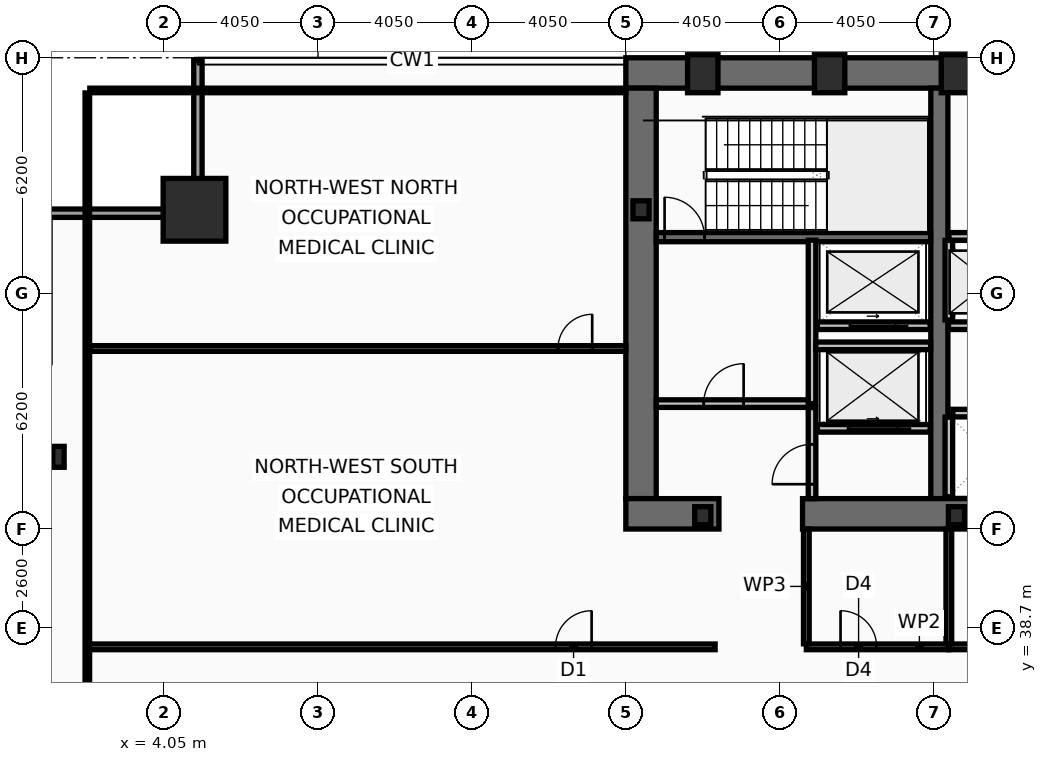
"""IFC4 building model, lengths in metres.
Left out: names, types, materials, properties, quantities, classifications, styles, units other than length and angle.
Written with IfcOpenShell. Run it as: python <this file> out.ifc"""

import sys

from ifc_helpers import new_model, si_unit, direction, frame, frame_2d, origin, origin_2d, place, context, subcontext, project, spatial, rectangle, hollow_rectangle, i_section, extrude, element, fill, save


model = new_model("IFC4")
c1 = context("Model", 3, precision=1e-05, world=origin(), true_north=direction((0.0, 1.0)))
c2 = subcontext(c1, "Body", "Model", "MODEL_VIEW")
j1 = project(units=[si_unit("LENGTHUNIT", "METRE"), si_unit("PLANEANGLEUNIT", "RADIAN")], contexts=[c1])
p1 = place(None, origin())
s1 = spatial("IfcSite", under=j1, at=p1, CompositionType="ELEMENT")
p2 = place(p1, origin())
s2 = spatial("IfcBuilding", under=s1, at=p2, CompositionType="ELEMENT")
p3 = place(p2, frame((0.0, 0.0, 73.8)))
s3 = spatial("IfcBuildingStorey", under=s2, at=p3, CompositionType="ELEMENT", Elevation=73.8)
p4 = place(p3, frame((16.2, 53.3, 0.0), z_axis=(0.0, 0.0, 1.0), x_axis=(1.0, 0.0, 0.0)))
e1 = element("IfcWall", 1, at=p4, inside=s3, PredefinedType="SHEAR", context=c2, shape_type="SweptSolid", body=[
    extrude(rectangle(XDim=40.5, YDim=0.8, at=frame_2d((20.25, 0.0))), origin(), (0.0, 0.0, 1.0), 3.82),
])
p5 = place(p3, frame((16.6, 42.1, 0.0), z_axis=(0.0, 0.0, 1.0), x_axis=(0.0, 1.0, 0.0)))
e2 = element("IfcWall", 2, at=p5, inside=s3, PredefinedType="SHEAR", context=c2, shape_type="SweptSolid", body=[
    extrude(rectangle(XDim=10.8, YDim=0.8, at=frame_2d((5.4, 0.0))), origin(), (0.0, 0.0, 1.0), 3.82),
])
p6 = place(p3, frame((24.45, 42.1, 0.0), z_axis=(0.0, 0.0, 1.0), x_axis=(0.0, 1.0, 0.0)))
e3 = element("IfcWall", 3, at=p6, inside=s3, PredefinedType="SHEAR", context=c2, shape_type="SweptSolid", body=[
    extrude(rectangle(XDim=10.8, YDim=0.45, at=frame_2d((5.4, 0.0))), origin(), (0.0, 0.0, 1.0), 3.82),
])
p7 = place(p3, frame((18.65, 41.7, 0.0), z_axis=(0.0, 0.0, 1.0), x_axis=(-1.0, 0.0, 0.0)))
e4 = element("IfcWall", 4, at=p7, inside=s3, PredefinedType="SHEAR", context=c2, shape_type="SweptSolid", body=[
    extrude(rectangle(XDim=2.45, YDim=0.8, at=frame_2d((1.225, 0.0))), origin(), (0.0, 0.0, 1.0), 3.82),
])
p8 = place(p3, frame((32.3, 41.7, 0.0), z_axis=(0.0, 0.0, 1.0), x_axis=(-1.0, 0.0, 0.0)))
e5 = element("IfcWall", 5, at=p8, inside=s3, PredefinedType="SHEAR", context=c2, shape_type="SweptSolid", body=[
    extrude(rectangle(XDim=11.45, YDim=0.8, at=frame_2d((5.725, 0.0))), origin(), (0.0, 0.0, 1.0), 3.82),
])
p9 = place(p3, frame((17.0, 48.98, 0.0), z_axis=(0.0, 0.0, 1.0), x_axis=(1.0, 0.0, 0.0)))
e6 = element("IfcWall", 6, at=p9, inside=s3, PredefinedType="SHEAR", context=c2, shape_type="SweptSolid", body=[
    extrude(rectangle(XDim=7.22, YDim=0.24, at=frame_2d((3.61, 0.0))), origin(), (0.0, 0.0, 1.0), 3.82),
])
p10 = place(p9, frame((0.22, 0.0, 0.0)))
e7 = element("IfcOpeningElement", 7, at=p10, cuts=e6, PredefinedType="OPENING", context=c2, shape_type="SweptSolid", body=[
    extrude(rectangle(XDim=1.05, YDim=2.15, at=frame_2d((0.525, 1.075))), frame((0.0, 0.13, 0.0), z_axis=(0.0, -1.0, 0.0), x_axis=(1.0, 0.0, 0.0)), (0.0, 0.0, 1.0), 0.26),
])
p11 = place(p3, frame((4.85, 49.7, 0.0), z_axis=(0.0, 0.0, 1.0), x_axis=(1.0, 0.0, 0.0)))
e8 = element("IfcColumn", 8, at=p11, inside=s3, PredefinedType="COLUMN", context=c2, shape_type="SweptSolid", body=[
    extrude(hollow_rectangle(XDim=1.65, YDim=1.65, WallThickness=0.075, at=origin_2d()), origin(), (0.0, 0.0, 1.0), 4.0),
])
for number, where, z_axis, x_axis in (
    (9, (18.225, 53.28, 0.0), (0.0, 0.0, 1.0), (1.0, 0.0, 0.0)),
    (10, (21.562, 53.28, 0.0), (0.0, 0.0, 1.0), (1.0, 0.0, 0.0)),
    (11, (24.9, 53.28, 0.0), (0.0, 0.0, 1.0), (1.0, 0.0, 0.0)),
):
    element("IfcColumn", number, at=place(p3, frame(where, z_axis=z_axis, x_axis=x_axis)), inside=s3, PredefinedType="COLUMN", context=c2, shape_type="SweptSolid", body=[
        extrude(hollow_rectangle(XDim=0.8, YDim=1.0, WallThickness=0.055, at=origin_2d()), origin(), (0.0, 0.0, 1.0), 4.0),
    ])
p12 = place(p3, frame((1.27, 43.2, 0.0), z_axis=(0.0, 0.0, 1.0), x_axis=(1.0, 0.0, 0.0)))
e12 = element("IfcColumn", 12, at=p12, inside=s3, PredefinedType="COLUMN", context=c2, shape_type="SweptSolid", body=[
    extrude(i_section(OverallWidth=0.3, OverallDepth=0.55, WebThickness=0.015, FlangeThickness=0.029, at=origin_2d()), origin(), (0.0, 0.0, 1.0), 4.0),
])
for number, where, z_axis, x_axis in (
    (13, (16.6, 49.7, 0.0), (0.0, 0.0, 1.0), (1.0, 0.0, 0.0)),
    (14, (18.225, 41.65, 0.0), (0.0, 0.0, 1.0), (1.0, 0.0, 0.0)),
    (15, (24.9, 41.65, 0.0), (0.0, 0.0, 1.0), (1.0, 0.0, 0.0)),
):
    element("IfcColumn", number, at=place(p3, frame(where, z_axis=z_axis, x_axis=x_axis)), inside=s3, PredefinedType="COLUMN", context=c2, shape_type="SweptSolid", body=[
        extrude(i_section(OverallWidth=0.424, OverallDepth=0.474, WebThickness=0.048, FlangeThickness=0.077, at=origin_2d()), origin(), (0.0, 0.0, 1.0), 4.0),
    ])
p13 = place(p3, frame((0.83, 49.61, 0.0), z_axis=(0.0, 0.0, 1.0), x_axis=(1.0, 0.0, 0.0)))
e16 = element("IfcWall", 16, at=p13, inside=s3, PredefinedType="SOLIDWALL", context=c2, shape_type="SweptSolid", body=[
    extrude(rectangle(XDim=4.22, YDim=0.22, at=frame_2d((2.11, 0.0))), origin(), (0.0, 0.0, 1.0), 3.16),
])
p14 = place(p3, frame((4.94, 49.72, 0.0), z_axis=(0.0, 0.0, 1.0), x_axis=(0.0, 1.0, 0.0)))
e17 = element("IfcWall", 17, at=p14, inside=s3, PredefinedType="SOLIDWALL", context=c2, shape_type="SweptSolid", body=[
    extrude(rectangle(XDim=3.91, YDim=0.22, at=frame_2d((1.955, 0.0))), origin(), (0.0, 0.0, 1.0), 3.16),
])
p15 = place(p3, frame((24.21, 43.95, 0.0), z_axis=(0.0, 0.0, 1.0), x_axis=(-1.0, 0.0, 0.0)))
e18 = element("IfcWall", 18, at=p15, inside=s3, PredefinedType="PARTITIONING", context=c2, shape_type="SweptSolid", body=[
    extrude(rectangle(XDim=2.97, YDim=0.2, at=frame_2d((1.485, 0.0))), origin(), (0.0, 0.0, 1.0), 3.82),
])
p16 = place(p15, frame((0.86, 0.0, 0.0)))
e19 = element("IfcOpeningElement", 19, at=p16, cuts=e18, PredefinedType="OPENING", context=c2, shape_type="SweptSolid", body=[
    extrude(rectangle(XDim=1.3, YDim=2.18, at=frame_2d((0.65, 1.09))), frame((0.0, 0.11, 0.0), z_axis=(0.0, -1.0, 0.0), x_axis=(1.0, 0.0, 0.0)), (0.0, 0.0, 1.0), 0.22),
])
p17 = place(p3, frame((24.21, 46.65, 0.0), z_axis=(0.0, 0.0, 1.0), x_axis=(-1.0, 0.0, 0.0)))
e20 = element("IfcWall", 20, at=p17, inside=s3, PredefinedType="PARTITIONING", context=c2, shape_type="SweptSolid", body=[
    extrude(rectangle(XDim=2.97, YDim=0.2, at=frame_2d((1.485, 0.0))), origin(), (0.0, 0.0, 1.0), 3.82),
])
p18 = place(p17, frame((0.91, 0.0, 0.0)))
e21 = element("IfcOpeningElement", 21, at=p18, cuts=e20, PredefinedType="OPENING", context=c2, shape_type="SweptSolid", body=[
    extrude(rectangle(XDim=1.2, YDim=2.18, at=frame_2d((0.6, 1.09))), frame((0.0, 0.11, 0.0), z_axis=(0.0, -1.0, 0.0), x_axis=(1.0, 0.0, 0.0)), (0.0, 0.0, 1.0), 0.22),
])
p19 = place(p3, frame((31.22, 46.65, 0.0), z_axis=(0.0, 0.0, 1.0), x_axis=(-1.0, 0.0, 0.0)))
e22 = element("IfcWall", 22, at=p19, inside=s3, PredefinedType="PARTITIONING", context=c2, shape_type="SweptSolid", body=[
    extrude(rectangle(XDim=6.53, YDim=0.2, at=frame_2d((3.265, 0.0))), origin(), (0.0, 0.0, 1.0), 3.82),
])
p20 = place(p19, frame((4.9, 0.0, 0.0)))
e23 = element("IfcOpeningElement", 23, at=p20, cuts=e22, PredefinedType="OPENING", context=c2, shape_type="SweptSolid", body=[
    extrude(rectangle(XDim=1.1, YDim=2.18, at=frame_2d((0.55, 1.09))), frame((0.0, 0.11, 0.0), z_axis=(0.0, -1.0, 0.0), x_axis=(1.0, 0.0, 0.0)), (0.0, 0.0, 1.0), 0.22),
])
p21 = place(p19, frame((2.74, 0.0, 0.0)))
e24 = element("IfcOpeningElement", 24, at=p21, cuts=e22, PredefinedType="OPENING", context=c2, shape_type="SweptSolid", body=[
    extrude(rectangle(XDim=1.1, YDim=2.18, at=frame_2d((0.55, 1.09))), frame((0.0, 0.11, 0.0), z_axis=(0.0, -1.0, 0.0), x_axis=(1.0, 0.0, 0.0)), (0.0, 0.0, 1.0), 0.22),
])
p22 = place(p19, frame((0.58, 0.0, 0.0)))
e25 = element("IfcOpeningElement", 25, at=p22, cuts=e22, PredefinedType="OPENING", context=c2, shape_type="SweptSolid", body=[
    extrude(rectangle(XDim=1.1, YDim=2.18, at=frame_2d((0.55, 1.09))), frame((0.0, 0.11, 0.0), z_axis=(0.0, -1.0, 0.0), x_axis=(1.0, 0.0, 0.0)), (0.0, 0.0, 1.0), 0.22),
])
p23 = place(p3, frame((21.1, 44.6, 0.0), z_axis=(0.0, 0.0, 1.0), x_axis=(0.0, 1.0, 0.0)))
e26 = element("IfcWall", 26, at=p23, inside=s3, PredefinedType="PARTITIONING", context=c2, shape_type="SweptSolid", body=[
    extrude(rectangle(XDim=4.3, YDim=0.2, at=frame_2d((2.15, 0.0))), origin(), (0.0, 0.0, 1.0), 3.82),
])
p24 = place(p3, frame((17.0, 44.6, 0.0), z_axis=(0.0, 0.0, 1.0), x_axis=(1.0, 0.0, 0.0)))
e27 = element("IfcWall", 27, at=p24, inside=s3, PredefinedType="PARTITIONING", context=c2, shape_type="SweptSolid", body=[
    extrude(rectangle(XDim=4.0, YDim=0.2, at=frame_2d((2.0, 0.0))), origin(), (0.0, 0.0, 1.0), 3.82),
])
p25 = place(p24, frame((1.25, 0.0, 0.0)))
e28 = element("IfcOpeningElement", 28, at=p25, cuts=e27, PredefinedType="OPENING", context=c2, shape_type="SweptSolid", body=[
    extrude(rectangle(XDim=1.05, YDim=2.15, at=frame_2d((0.525, 1.075))), frame((0.0, 0.11, 0.0), z_axis=(0.0, -1.0, 0.0), x_axis=(1.0, 0.0, 0.0)), (0.0, 0.0, 1.0), 0.22),
])
p26 = place(p3, frame((21.2, 46.12, 0.0), z_axis=(0.0, 0.0, 1.0), x_axis=(1.0, 0.0, 0.0)))
e29 = element("IfcWall", 29, at=p26, inside=s3, PredefinedType="PARTITIONING", context=c2, shape_type="SweptSolid", body=[
    extrude(rectangle(XDim=3.02, YDim=0.2, at=frame_2d((1.51, 0.0))), origin(), (0.0, 0.0, 1.0), 3.82),
])
p27 = place(p3, frame((21.1, 42.1, 0.0), z_axis=(0.0, 0.0, 1.0), x_axis=(0.0, 1.0, 0.0)))
e30 = element("IfcWall", 30, at=p27, inside=s3, PredefinedType="PARTITIONING", context=c2, shape_type="SweptSolid", body=[
    extrude(rectangle(XDim=2.395, YDim=0.2, at=frame_2d((1.198, 0.0))), origin(), (0.0, 0.0, 1.0), 3.82),
])
p28 = place(p27, frame((0.38, 0.0, 0.0)))
e31 = element("IfcOpeningElement", 31, at=p28, cuts=e30, PredefinedType="OPENING", context=c2, shape_type="SweptSolid", body=[
    extrude(rectangle(XDim=1.05, YDim=2.15, at=frame_2d((0.525, 1.075))), frame((0.0, 0.11, 0.0), z_axis=(0.0, -1.0, 0.0), x_axis=(1.0, 0.0, 0.0)), (0.0, 0.0, 1.0), 0.22),
])
p29 = place(p3, frame((24.7, 46.8, 0.0), z_axis=(0.0, 0.0, 1.0), x_axis=(0.0, 1.0, 0.0)))
e32 = element("IfcWall", 32, at=p29, inside=s3, PredefinedType="PARTITIONING", context=c2, shape_type="SweptSolid", body=[
    extrude(rectangle(XDim=2.095, YDim=0.2, at=frame_2d((1.047, 0.0))), origin(), (0.0, 0.0, 1.0), 3.82),
])
p30 = place(p3, frame((24.805, 44.35, 0.0), z_axis=(0.0, 0.0, 1.0), x_axis=(1.0, 0.0, 0.0)))
e33 = element("IfcWall", 33, at=p30, inside=s3, PredefinedType="PARTITIONING", context=c2, shape_type="SweptSolid", body=[
    extrude(rectangle(XDim=6.27, YDim=0.2, at=frame_2d((3.135, 0.0))), origin(), (0.0, 0.0, 1.0), 3.82),
])
p31 = place(p3, frame((24.7, 42.15, 0.0), z_axis=(0.0, 0.0, 1.0), x_axis=(0.0, 1.0, 0.0)))
e34 = element("IfcWall", 34, at=p31, inside=s3, PredefinedType="PARTITIONING", context=c2, shape_type="SweptSolid", body=[
    extrude(rectangle(XDim=2.095, YDim=0.2, at=frame_2d((1.048, 0.0))), origin(), (0.0, 0.0, 1.0), 3.82),
])
p32 = place(p3, frame((24.7, 52.86, 0.0), z_axis=(0.0, 0.0, 1.0), x_axis=(1.0, 0.0, 0.0)))
e35 = element("IfcWall", 35, at=p32, inside=s3, PredefinedType="PARTITIONING", context=c2, shape_type="SweptSolid", body=[
    extrude(rectangle(XDim=7.72, YDim=0.12, at=frame_2d((3.86, 0.0))), origin(), (0.0, 0.0, 1.0), 3.82),
])
p33 = place(p3, frame((24.7, 49.0, 0.0), z_axis=(0.0, 0.0, 1.0), x_axis=(1.0, 0.0, 0.0)))
e36 = element("IfcWall", 36, at=p33, inside=s3, PredefinedType="PARTITIONING", context=c2, shape_type="SweptSolid", body=[
    extrude(rectangle(XDim=7.72, YDim=0.2, at=frame_2d((3.86, 0.0))), origin(), (0.0, 0.0, 1.0), 3.82),
])
p34 = place(p33, frame((6.56, 0.0, 0.0)))
e37 = element("IfcOpeningElement", 37, at=p34, cuts=e36, PredefinedType="OPENING", context=c2, shape_type="SweptSolid", body=[
    extrude(rectangle(XDim=0.95, YDim=2.1, at=frame_2d((0.475, 1.05))), frame((0.0, 0.11, 0.0), z_axis=(0.0, -1.0, 0.0), x_axis=(1.0, 0.0, 0.0)), (0.0, 0.0, 1.0), 0.22),
])
p35 = place(p3, frame((20.95, 38.2, 0.0), z_axis=(0.0, 0.0, 1.0), x_axis=(1.0, 0.0, 0.0)))
e38 = element("IfcWall", 38, at=p35, inside=s3, PredefinedType="PARTITIONING", context=c2, shape_type="SweptSolid", body=[
    extrude(rectangle(XDim=3.75, YDim=0.15, at=frame_2d((1.875, 0.0))), origin(), (0.0, 0.0, 1.0), 3.01),
])
p36 = place(p35, frame((0.9, 0.0, 0.0)))
e39 = element("IfcOpeningElement", 39, at=p36, cuts=e38, PredefinedType="OPENING", context=c2, shape_type="SweptSolid", body=[
    extrude(rectangle(XDim=0.95, YDim=2.05, at=frame_2d((0.475, 1.025))), frame((0.0, 0.085, 0.0), z_axis=(0.0, -1.0, 0.0), x_axis=(1.0, 0.0, 0.0)), (0.0, 0.0, 1.0), 0.17),
])
p37 = place(p3, frame((24.7, 38.2, 0.0), z_axis=(0.0, 0.0, 1.0), x_axis=(1.0, 0.0, 0.0)))
e40 = element("IfcWall", 40, at=p37, inside=s3, PredefinedType="PARTITIONING", context=c2, shape_type="SweptSolid", body=[
    extrude(rectangle(XDim=4.5, YDim=0.15, at=frame_2d((2.25, 0.0))), origin(), (0.0, 0.0, 1.0), 3.01),
])
p38 = place(p37, frame((0.9, 0.0, 0.0)))
e41 = element("IfcOpeningElement", 41, at=p38, cuts=e40, PredefinedType="OPENING", context=c2, shape_type="SweptSolid", body=[
    extrude(rectangle(XDim=0.95, YDim=2.05, at=frame_2d((0.475, 1.025))), frame((0.0, 0.085, 0.0), z_axis=(0.0, -1.0, 0.0), x_axis=(1.0, 0.0, 0.0)), (0.0, 0.0, 1.0), 0.17),
])
p39 = place(p3, frame((20.95, 38.28, 0.0), z_axis=(0.0, 0.0, 1.0), x_axis=(0.0, 1.0, 0.0)))
e42 = element("IfcWall", 42, at=p39, inside=s3, PredefinedType="PARTITIONING", context=c2, shape_type="SweptSolid", body=[
    extrude(rectangle(XDim=3.02, YDim=0.15, at=frame_2d((1.51, 0.0))), origin(), (0.0, 0.0, 1.0), 3.82),
])
p40 = place(p3, frame((24.7, 38.28, 0.0), z_axis=(0.0, 0.0, 1.0), x_axis=(0.0, 1.0, 0.0)))
e43 = element("IfcWall", 43, at=p40, inside=s3, PredefinedType="PARTITIONING", context=c2, shape_type="SweptSolid", body=[
    extrude(rectangle(XDim=3.02, YDim=0.15, at=frame_2d((1.51, 0.0))), origin(), (0.0, 0.0, 1.0), 3.01),
])
p41 = place(p3, frame((2.03, 38.2, 0.0), z_axis=(0.0, 0.0, 1.0), x_axis=(1.0, 0.0, 0.0)))
e44 = element("IfcWall", 44, at=p41, inside=s3, PredefinedType="PARTITIONING", context=c2, shape_type="SweptSolid", body=[
    extrude(rectangle(XDim=16.52, YDim=0.15, at=frame_2d((8.26, 0.0))), origin(), (0.0, 0.0, 1.0), 3.01),
])
p42 = place(p41, frame((12.32, 0.0, 0.0)))
e45 = element("IfcOpeningElement", 45, at=p42, cuts=e44, PredefinedType="OPENING", context=c2, shape_type="SweptSolid", body=[
    extrude(rectangle(XDim=0.95, YDim=2.05, at=frame_2d((0.475, 1.025))), frame((0.0, 0.085, 0.0), z_axis=(0.0, -1.0, 0.0), x_axis=(1.0, 0.0, 0.0)), (0.0, 0.0, 1.0), 0.17),
])
p43 = place(p3, frame((2.095, 46.05, 0.0), z_axis=(0.0, 0.0, 1.0), x_axis=(1.0, 0.0, 0.0)))
e46 = element("IfcWall", 46, at=p43, inside=s3, PredefinedType="PARTITIONING", context=c2, shape_type="SweptSolid", body=[
    extrude(rectangle(XDim=14.105, YDim=0.15, at=frame_2d((7.052, 0.0))), origin(), (0.0, 0.0, 1.0), 3.16),
])
p44 = place(p43, frame((12.32, 0.0, 0.0)))
e47 = element("IfcOpeningElement", 47, at=p44, cuts=e46, PredefinedType="OPENING", context=c2, shape_type="SweptSolid", body=[
    extrude(rectangle(XDim=0.9, YDim=2.05, at=frame_2d((0.45, 1.025))), frame((0.0, 0.085, 0.0), z_axis=(0.0, -1.0, 0.0), x_axis=(1.0, 0.0, 0.0)), (0.0, 0.0, 1.0), 0.17),
])
p45 = place(p3, frame((2.03, 10.665, 0.0), z_axis=(0.0, 0.0, 1.0), x_axis=(0.0, 1.0, 0.0)))
e48 = element("IfcWall", 48, at=p45, inside=s3, PredefinedType="PARTITIONING", context=c2, shape_type="SweptSolid", body=[
    extrude(rectangle(XDim=42.11, YDim=0.12, at=frame_2d((21.055, 0.0))), origin(), (0.0, 0.0, 1.0), 3.01),
])
p46 = place(p3, frame((2.095, 52.84, 0.0), z_axis=(0.0, 0.0, 1.0), x_axis=(1.0, 0.0, 0.0)))
e49 = element("IfcWall", 49, at=p46, inside=s3, PredefinedType="PARTITIONING", context=c2, shape_type="SweptSolid", body=[
    extrude(rectangle(XDim=14.105, YDim=0.12, at=frame_2d((7.052, 0.0))), origin(), (0.0, 0.0, 1.0), 3.82),
])
p47 = place(p10, origin())
e50 = element("IfcDoor", 50, at=p47, inside=s3, OperationType="SINGLE_SWING_LEFT", PredefinedType="DOOR", context=c2, shape_type="SweptSolid", body=[
    extrude(rectangle(XDim=1.05, YDim=2.15, at=frame_2d((0.525, 1.075))), frame((0.0, 0.025, 0.0), z_axis=(0.0, -1.0, 0.0), x_axis=(1.0, 0.0, 0.0)), (0.0, 0.0, 1.0), 0.05),
])
fill(e7, e50)
p48 = place(p16, origin())
e51 = element("IfcDoor", 51, at=p48, inside=s3, OperationType="SLIDING_TO_LEFT", PredefinedType="DOOR", context=c2, shape_type="SweptSolid", body=[
    extrude(rectangle(XDim=1.3, YDim=2.18, at=frame_2d((0.65, 1.09))), frame((0.0, 0.025, 0.0), z_axis=(0.0, -1.0, 0.0), x_axis=(1.0, 0.0, 0.0)), (0.0, 0.0, 1.0), 0.05),
])
fill(e19, e51)
p49 = place(p18, origin())
e52 = element("IfcDoor", 52, at=p49, inside=s3, OperationType="SLIDING_TO_LEFT", PredefinedType="DOOR", context=c2, shape_type="SweptSolid", body=[
    extrude(rectangle(XDim=1.2, YDim=2.18, at=frame_2d((0.6, 1.09))), frame((0.0, 0.025, 0.0), z_axis=(0.0, -1.0, 0.0), x_axis=(1.0, 0.0, 0.0)), (0.0, 0.0, 1.0), 0.05),
])
fill(e21, e52)
p50 = place(p25, origin())
e53 = element("IfcDoor", 53, at=p50, inside=s3, OperationType="SINGLE_SWING_RIGHT", PredefinedType="DOOR", context=c2, shape_type="SweptSolid", body=[
    extrude(rectangle(XDim=1.05, YDim=2.15, at=frame_2d((0.525, 1.075))), frame((0.0, 0.025, 0.0), z_axis=(0.0, -1.0, 0.0), x_axis=(1.0, 0.0, 0.0)), (0.0, 0.0, 1.0), 0.05),
])
fill(e28, e53)
p51 = place(p28, origin())
e54 = element("IfcDoor", 54, at=p51, inside=s3, OperationType="SINGLE_SWING_LEFT", PredefinedType="DOOR", context=c2, shape_type="SweptSolid", body=[
    extrude(rectangle(XDim=1.05, YDim=2.15, at=frame_2d((0.525, 1.075))), frame((0.0, 0.025, 0.0), z_axis=(0.0, -1.0, 0.0), x_axis=(1.0, 0.0, 0.0)), (0.0, 0.0, 1.0), 0.05),
])
fill(e31, e54)
p52 = place(p36, origin())
e55 = element("IfcDoor", 55, at=p52, inside=s3, OperationType="SINGLE_SWING_LEFT", PredefinedType="DOOR", context=c2, shape_type="SweptSolid", body=[
    extrude(rectangle(XDim=0.95, YDim=2.05, at=frame_2d((0.475, 1.025))), frame((0.0, 0.025, 0.0), z_axis=(0.0, -1.0, 0.0), x_axis=(1.0, 0.0, 0.0)), (0.0, 0.0, 1.0), 0.05),
])
fill(e39, e55)
p53 = place(p42, origin())
e56 = element("IfcDoor", 56, at=p53, inside=s3, OperationType="SINGLE_SWING_RIGHT", PredefinedType="DOOR", context=c2, shape_type="SweptSolid", body=[
    extrude(rectangle(XDim=0.95, YDim=2.05, at=frame_2d((0.475, 1.025))), frame((0.0, 0.025, 0.0), z_axis=(0.0, -1.0, 0.0), x_axis=(1.0, 0.0, 0.0)), (0.0, 0.0, 1.0), 0.05),
])
fill(e45, e56)
p54 = place(p44, origin())
e57 = element("IfcDoor", 57, at=p54, inside=s3, OperationType="SINGLE_SWING_RIGHT", PredefinedType="DOOR", context=c2, shape_type="SweptSolid", body=[
    extrude(rectangle(XDim=0.9, YDim=2.05, at=frame_2d((0.45, 1.025))), frame((0.0, 0.025, 0.0), z_axis=(0.0, -1.0, 0.0), x_axis=(1.0, 0.0, 0.0)), (0.0, 0.0, 1.0), 0.05),
])
fill(e47, e57)
save(model, sys.argv[1])
